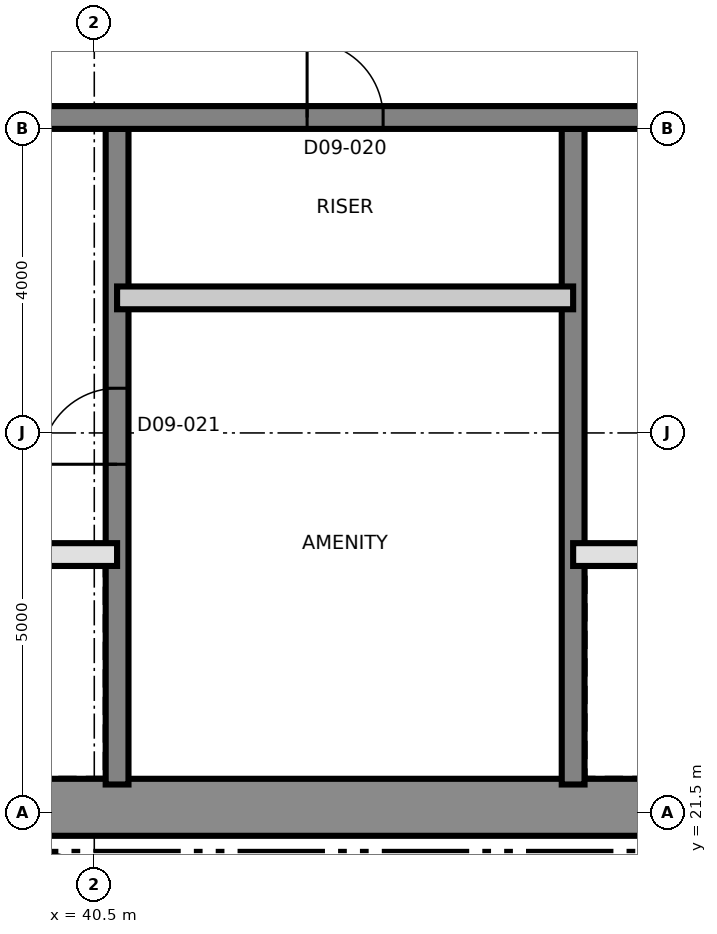
"""IFC4 building model, lengths in metres.
Left out: names, types, materials, properties, quantities, classifications, styles, units other than length and angle.
Written with IfcOpenShell. Run it as: python <this file> out.ifc"""

import sys

from ifc_helpers import new_model, si_unit, direction, frame, frame_2d, origin, place, context, subcontext, project, spatial, rectangle, extrude, element, fill, save


model = new_model("IFC4")
c1 = context("Model", 3, precision=1e-05, world=origin(), true_north=direction((0.0, 1.0)))
c2 = subcontext(c1, "Body", "Model", "MODEL_VIEW")
j1 = project(units=[si_unit("LENGTHUNIT", "METRE"), si_unit("PLANEANGLEUNIT", "RADIAN")], contexts=[c1])
p1 = place(None, origin())
s1 = spatial("IfcSite", under=j1, at=p1, CompositionType="ELEMENT")
p2 = place(p1, origin())
s2 = spatial("IfcBuilding", under=s1, at=p2, CompositionType="ELEMENT")
p3 = place(p2, frame((0.0, 0.0, 105.6)))
s3 = spatial("IfcBuildingStorey", under=s2, at=p3, CompositionType="ELEMENT", Elevation=105.6)
p4 = place(p3, frame((31.125, 21.575, 0.0), z_axis=(0.0, 0.0, 1.0), x_axis=(1.0, 0.0, 0.0)))
e1 = element("IfcWall", 1, at=p4, inside=s3, PredefinedType="SHEAR", context=c2, shape_type="SweptSolid", body=[
    extrude(rectangle(XDim=27.0, YDim=0.75, at=frame_2d((13.5, 0.0))), origin(), (0.0, 0.0, 1.0), 3.7),
])
p5 = place(p3, frame((40.8, 21.875, 0.0), z_axis=(0.0, 0.0, 1.0), x_axis=(0.0, 1.0, 0.0)))
e2 = element("IfcWall", 2, at=p5, inside=s3, PredefinedType="SHEAR", context=c2, shape_type="SweptSolid", body=[
    extrude(rectangle(XDim=8.625, YDim=0.3, at=frame_2d((4.312, 0.0))), origin(), (0.0, 0.0, 1.0), 3.7),
])
p6 = place(p5, frame((4.213, 0.0, 0.0)))
e3 = element("IfcOpeningElement", 3, at=p6, cuts=e2, PredefinedType="OPENING", context=c2, shape_type="SweptSolid", body=[
    extrude(rectangle(XDim=1.0, YDim=2.1, at=frame_2d((0.5, 1.05))), frame((0.0, 0.16, 0.0), z_axis=(0.0, -1.0, 0.0), x_axis=(1.0, 0.0, 0.0)), (0.0, 0.0, 1.0), 0.32),
])
p7 = place(p3, frame((46.8, 21.875, 0.0), z_axis=(0.0, 0.0, 1.0), x_axis=(0.0, 1.0, 0.0)))
e4 = element("IfcWall", 4, at=p7, inside=s3, PredefinedType="SHEAR", context=c2, shape_type="SweptSolid", body=[
    extrude(rectangle(XDim=8.625, YDim=0.3, at=frame_2d((4.312, 0.0))), origin(), (0.0, 0.0, 1.0), 3.7),
])
p8 = place(p3, frame((31.875, 30.65, 0.0), z_axis=(0.0, 0.0, 1.0), x_axis=(1.0, 0.0, 0.0)))
e5 = element("IfcWall", 5, at=p8, inside=s3, PredefinedType="SHEAR", context=c2, shape_type="SweptSolid", body=[
    extrude(rectangle(XDim=26.25, YDim=0.3, at=frame_2d((13.125, 0.0))), origin(), (0.0, 0.0, 1.0), 3.7),
])
p9 = place(p8, frame((24.625, 0.0, 0.0)))
e6 = element("IfcOpeningElement", 6, at=p9, cuts=e5, PredefinedType="OPENING", context=c2, shape_type="SweptSolid", body=[
    extrude(rectangle(XDim=1.0, YDim=2.1, at=frame_2d((0.5, 1.05))), frame((0.0, 0.16, 0.0), z_axis=(0.0, -1.0, 0.0), x_axis=(1.0, 0.0, 0.0)), (0.0, 0.0, 1.0), 0.32),
])
p10 = place(p8, frame((11.425, 0.0, 0.0)))
e7 = element("IfcOpeningElement", 7, at=p10, cuts=e5, PredefinedType="OPENING", context=c2, shape_type="SweptSolid", body=[
    extrude(rectangle(XDim=1.0, YDim=2.1, at=frame_2d((0.5, 1.05))), frame((0.0, 0.16, 0.0), z_axis=(0.0, -1.0, 0.0), x_axis=(1.0, 0.0, 0.0)), (0.0, 0.0, 1.0), 0.32),
])
p11 = place(p3, frame((39.735, 20.846, 0.0), z_axis=(0.0, 0.0, 1.0), x_axis=(0.97206095595, -0.234728562212, 0.0)))
e8 = element("IfcWall", 8, at=p11, inside=s3, PredefinedType="SOLIDWALL", context=c2, shape_type="SweptSolid", body=[
    extrude(rectangle(XDim=2.35, YDim=0.3, at=frame_2d((1.175, 0.0))), origin(), (0.0, 0.0, 1.0), 3.4),
])
p12 = place(p3, frame((31.8, 24.9, 0.0), z_axis=(0.0, 0.0, 1.0), x_axis=(1.0, 0.0, 0.0)))
e9 = element("IfcWall", 9, at=p12, inside=s3, PredefinedType="SOLIDWALL", context=c2, shape_type="SweptSolid", body=[
    extrude(rectangle(XDim=9.0, YDim=0.3, at=frame_2d((4.5, 0.0))), origin(), (0.0, 0.0, 1.0), 3.4),
])
p13 = place(p12, frame((7.05, 0.0, 0.0)))
e10 = element("IfcOpeningElement", 10, at=p13, cuts=e9, PredefinedType="OPENING", context=c2, shape_type="SweptSolid", body=[
    extrude(rectangle(XDim=0.9, YDim=2.1, at=frame_2d((0.45, 1.05))), frame((0.0, 0.16, 0.0), z_axis=(0.0, -1.0, 0.0), x_axis=(1.0, 0.0, 0.0)), (0.0, 0.0, 1.0), 0.32),
])
p14 = place(p12, frame((0.95, 0.0, 0.0)))
e11 = element("IfcOpeningElement", 11, at=p14, cuts=e9, PredefinedType="OPENING", context=c2, shape_type="SweptSolid", body=[
    extrude(rectangle(XDim=1.1, YDim=2.4, at=frame_2d((0.55, 1.2))), frame((0.0, 0.16, 0.0), z_axis=(0.0, -1.0, 0.0), x_axis=(1.0, 0.0, 0.0)), (0.0, 0.0, 1.0), 0.32),
])
p15 = place(p12, frame((3.95, 0.0, 0.0)))
e12 = element("IfcOpeningElement", 12, at=p15, cuts=e9, PredefinedType="OPENING", context=c2, shape_type="SweptSolid", body=[
    extrude(rectangle(XDim=1.1, YDim=2.4, at=frame_2d((0.55, 1.2))), frame((0.0, 0.16, 0.0), z_axis=(0.0, -1.0, 0.0), x_axis=(1.0, 0.0, 0.0)), (0.0, 0.0, 1.0), 0.32),
])
p16 = place(p3, frame((46.8, 24.9, 0.0), z_axis=(0.0, 0.0, 1.0), x_axis=(1.0, 0.0, 0.0)))
e13 = element("IfcWall", 13, at=p16, inside=s3, PredefinedType="SOLIDWALL", context=c2, shape_type="SweptSolid", body=[
    extrude(rectangle(XDim=9.0, YDim=0.3, at=frame_2d((4.5, 0.0))), origin(), (0.0, 0.0, 1.0), 3.4),
])
p17 = place(p16, frame((1.05, 0.0, 0.0)))
e14 = element("IfcOpeningElement", 14, at=p17, cuts=e13, PredefinedType="OPENING", context=c2, shape_type="SweptSolid", body=[
    extrude(rectangle(XDim=0.9, YDim=2.1, at=frame_2d((0.45, 1.05))), frame((0.0, 0.16, 0.0), z_axis=(0.0, -1.0, 0.0), x_axis=(1.0, 0.0, 0.0)), (0.0, 0.0, 1.0), 0.32),
])
p18 = place(p3, frame((40.8, 28.277, 0.0), z_axis=(0.0, 0.0, 1.0), x_axis=(1.0, 0.0, 0.0)))
e15 = element("IfcWall", 15, at=p18, inside=s3, PredefinedType="PARTITIONING", context=c2, shape_type="SweptSolid", body=[
    extrude(rectangle(XDim=6.0, YDim=0.3, at=frame_2d((3.0, 0.0))), origin(), (0.0, 0.0, 1.0), 3.4),
])
p19 = place(p10, origin())
e16 = element("IfcDoor", 16, at=p19, inside=s3, OperationType="SINGLE_SWING_LEFT", PredefinedType="DOOR", context=c2, shape_type="SweptSolid", body=[
    extrude(rectangle(XDim=1.0, YDim=2.1, at=frame_2d((0.5, 1.05))), frame((0.0, 0.025, 0.0), z_axis=(0.0, -1.0, 0.0), x_axis=(1.0, 0.0, 0.0)), (0.0, 0.0, 1.0), 0.05),
])
fill(e7, e16)
p20 = place(p6, origin())
e17 = element("IfcDoor", 17, at=p20, inside=s3, OperationType="SINGLE_SWING_RIGHT", PredefinedType="DOOR", context=c2, shape_type="SweptSolid", body=[
    extrude(rectangle(XDim=1.0, YDim=2.1, at=frame_2d((0.5, 1.05))), frame((0.0, 0.025, 0.0), z_axis=(0.0, -1.0, 0.0), x_axis=(1.0, 0.0, 0.0)), (0.0, 0.0, 1.0), 0.05),
])
fill(e3, e17)
save(model, sys.argv[1])
